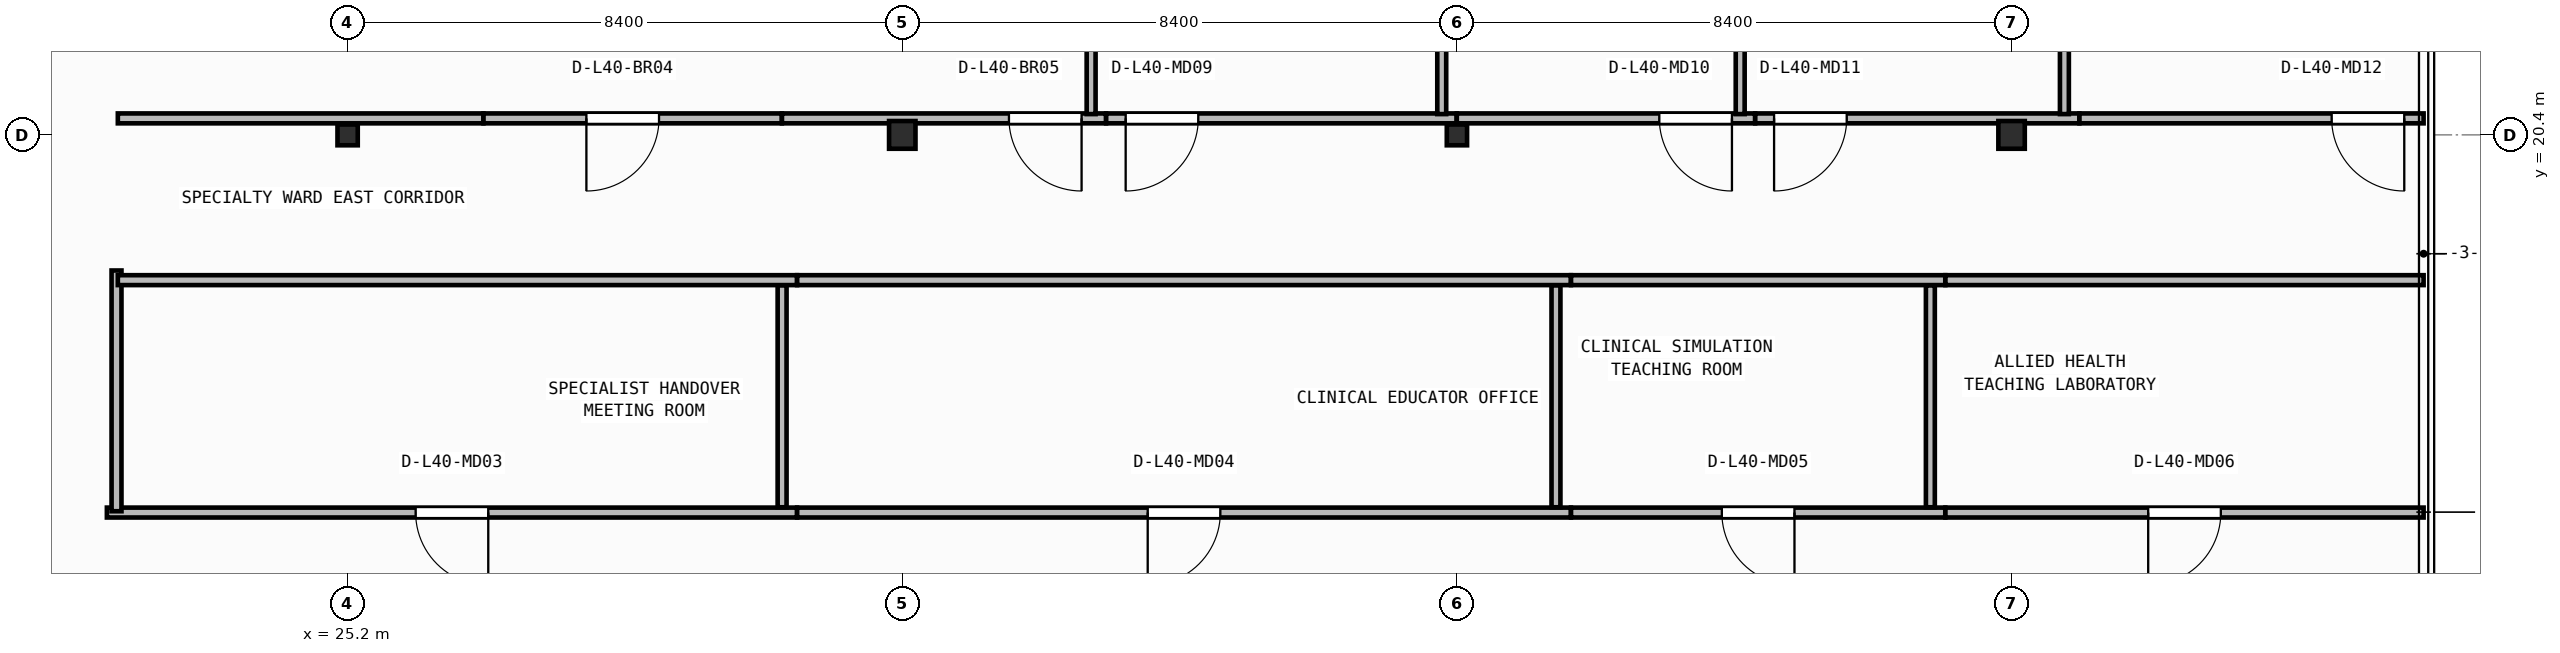
"""IFC4 building model, lengths in metres.
Left out: names, types, materials, properties, quantities, classifications, styles, units other than length and angle.
Written with IfcOpenShell. Run it as: python <this file> out.ifc"""

import sys

from ifc_helpers import new_model, si_unit, direction, frame, frame_2d, origin, origin_2d, place, context, subcontext, project, spatial, rectangle, i_section, extrude, element, fill, save


model = new_model("IFC4")
c1 = context("Model", 3, precision=1e-05, world=origin(), true_north=direction((0.0, 1.0)))
c2 = subcontext(c1, "Body", "Model", "MODEL_VIEW")
j1 = project(units=[si_unit("LENGTHUNIT", "METRE"), si_unit("PLANEANGLEUNIT", "RADIAN")], contexts=[c1])
p1 = place(None, origin())
s1 = spatial("IfcSite", under=j1, at=p1, CompositionType="ELEMENT")
p2 = place(p1, origin())
s2 = spatial("IfcBuilding", under=s1, at=p2, CompositionType="ELEMENT")
p3 = place(p2, frame((0.0, 0.0, 162.6)))
s3 = spatial("IfcBuildingStorey", under=s2, at=p3, CompositionType="ELEMENT", Elevation=162.6)
p4 = place(p3, frame((25.2, 20.4, 0.0), z_axis=(0.0, 0.0, 1.0), x_axis=(1.0, 0.0, 0.0)))
e1 = element("IfcColumn", 1, at=p4, inside=s3, PredefinedType="COLUMN", context=c2, shape_type="SweptSolid", body=[
    extrude(i_section(OverallWidth=0.307, OverallDepth=0.315, WebThickness=0.012, FlangeThickness=0.019, FilletRadius=0.017, at=origin_2d()), origin(), (0.0, 0.0, 1.0), 3.95),
])
p5 = place(p3, frame((33.6, 20.4, 0.0), z_axis=(0.0, 0.0, 1.0), x_axis=(1.0, 0.0, 0.0)))
e2 = element("IfcColumn", 2, at=p5, inside=s3, PredefinedType="COLUMN", context=c2, shape_type="SweptSolid", body=[
    extrude(i_section(OverallWidth=0.4, OverallDepth=0.42, WebThickness=0.025, FlangeThickness=0.04, at=origin_2d()), origin(), (0.0, 0.0, 1.0), 3.95),
])
p6 = place(p3, frame((42.0, 20.4, 0.0), z_axis=(0.0, 0.0, 1.0), x_axis=(1.0, 0.0, 0.0)))
e3 = element("IfcColumn", 3, at=p6, inside=s3, PredefinedType="COLUMN", context=c2, shape_type="SweptSolid", body=[
    extrude(i_section(OverallWidth=0.307, OverallDepth=0.315, WebThickness=0.012, FlangeThickness=0.019, FilletRadius=0.017, at=origin_2d()), origin(), (0.0, 0.0, 1.0), 3.95),
])
p7 = place(p3, frame((50.4, 20.4, 0.0), z_axis=(0.0, 0.0, 1.0), x_axis=(1.0, 0.0, 0.0)))
e4 = element("IfcColumn", 4, at=p7, inside=s3, PredefinedType="COLUMN", context=c2, shape_type="SweptSolid", body=[
    extrude(i_section(OverallWidth=0.4, OverallDepth=0.42, WebThickness=0.025, FlangeThickness=0.04, at=origin_2d()), origin(), (0.0, 0.0, 1.0), 3.95),
])
p8 = place(p3, frame((32.006, 14.68, 0.0), z_axis=(0.0, 0.0, 1.0), x_axis=(-1.0, 0.0, 0.0)))
e5 = element("IfcWall", 5, at=p8, inside=s3, PredefinedType="PARTITIONING", context=c2, shape_type="SweptSolid", body=[
    extrude(rectangle(XDim=10.452, YDim=0.15, at=frame_2d((5.226, 0.0))), origin(), (0.0, 0.0, 1.0), 3.71),
])
p9 = place(p8, frame((4.676, 0.0, 0.0)))
e6 = element("IfcOpeningElement", 6, at=p9, cuts=e5, PredefinedType="OPENING", context=c2, shape_type="SweptSolid", body=[
    extrude(rectangle(XDim=1.1, YDim=2.1, at=frame_2d((0.55, 1.05))), frame((0.0, 0.085, 0.0), z_axis=(0.0, -1.0, 0.0), x_axis=(1.0, 0.0, 0.0)), (0.0, 0.0, 1.0), 0.17),
])
p10 = place(p3, frame((43.726, 14.68, 0.0), z_axis=(0.0, 0.0, 1.0), x_axis=(-1.0, 0.0, 0.0)))
e7 = element("IfcWall", 7, at=p10, inside=s3, PredefinedType="PARTITIONING", context=c2, shape_type="SweptSolid", body=[
    extrude(rectangle(XDim=11.718, YDim=0.15, at=frame_2d((5.859, 0.0))), origin(), (0.0, 0.0, 1.0), 3.71),
])
p11 = place(p10, frame((5.309, 0.0, 0.0)))
e8 = element("IfcOpeningElement", 8, at=p11, cuts=e7, PredefinedType="OPENING", context=c2, shape_type="SweptSolid", body=[
    extrude(rectangle(XDim=1.1, YDim=2.1, at=frame_2d((0.55, 1.05))), frame((0.0, 0.085, 0.0), z_axis=(0.0, -1.0, 0.0), x_axis=(1.0, 0.0, 0.0)), (0.0, 0.0, 1.0), 0.17),
])
p12 = place(p3, frame((49.396, 14.68, 0.0), z_axis=(0.0, 0.0, 1.0), x_axis=(-1.0, 0.0, 0.0)))
e9 = element("IfcWall", 9, at=p12, inside=s3, PredefinedType="PARTITIONING", context=c2, shape_type="SweptSolid", body=[
    extrude(rectangle(XDim=5.668, YDim=0.15, at=frame_2d((2.834, 0.0))), origin(), (0.0, 0.0, 1.0), 3.71),
])
p13 = place(p12, frame((2.284, 0.0, 0.0)))
e10 = element("IfcOpeningElement", 10, at=p13, cuts=e9, PredefinedType="OPENING", context=c2, shape_type="SweptSolid", body=[
    extrude(rectangle(XDim=1.1, YDim=2.1, at=frame_2d((0.55, 1.05))), frame((0.0, 0.085, 0.0), z_axis=(0.0, -1.0, 0.0), x_axis=(1.0, 0.0, 0.0)), (0.0, 0.0, 1.0), 0.17),
])
p14 = place(p3, frame((56.64, 14.68, 0.0), z_axis=(0.0, 0.0, 1.0), x_axis=(-1.0, 0.0, 0.0)))
e11 = element("IfcWall", 11, at=p14, inside=s3, PredefinedType="PARTITIONING", context=c2, shape_type="SweptSolid", body=[
    extrude(rectangle(XDim=7.242, YDim=0.15, at=frame_2d((3.621, 0.0))), origin(), (0.0, 0.0, 1.0), 3.71),
])
p15 = place(p14, frame((3.071, 0.0, 0.0)))
e12 = element("IfcOpeningElement", 12, at=p15, cuts=e11, PredefinedType="OPENING", context=c2, shape_type="SweptSolid", body=[
    extrude(rectangle(XDim=1.1, YDim=2.1, at=frame_2d((0.55, 1.05))), frame((0.0, 0.085, 0.0), z_axis=(0.0, -1.0, 0.0), x_axis=(1.0, 0.0, 0.0)), (0.0, 0.0, 1.0), 0.17),
])
p16 = place(p3, frame((21.7, 14.7, 0.0), z_axis=(0.0, 0.0, 1.0), x_axis=(0.0, 1.0, 0.0)))
e13 = element("IfcWall", 13, at=p16, inside=s3, PredefinedType="PARTITIONING", context=c2, shape_type="SweptSolid", body=[
    extrude(rectangle(XDim=3.646, YDim=0.15, at=frame_2d((1.823, 0.0))), origin(), (0.0, 0.0, 1.0), 3.71),
])
p17 = place(p3, frame((21.72, 18.2, 0.0), z_axis=(0.0, 0.0, 1.0), x_axis=(1.0, 0.0, 0.0)))
e14 = element("IfcWall", 14, at=p17, inside=s3, PredefinedType="PARTITIONING", context=c2, shape_type="SweptSolid", body=[
    extrude(rectangle(XDim=10.286, YDim=0.15, at=frame_2d((5.143, 0.0))), origin(), (0.0, 0.0, 1.0), 3.71),
])
p18 = place(p3, frame((32.008, 18.2, 0.0), z_axis=(0.0, 0.0, 1.0), x_axis=(1.0, 0.0, 0.0)))
e15 = element("IfcWall", 15, at=p18, inside=s3, PredefinedType="PARTITIONING", context=c2, shape_type="SweptSolid", body=[
    extrude(rectangle(XDim=11.718, YDim=0.15, at=frame_2d((5.859, 0.0))), origin(), (0.0, 0.0, 1.0), 3.71),
])
p19 = place(p3, frame((43.728, 18.2, 0.0), z_axis=(0.0, 0.0, 1.0), x_axis=(1.0, 0.0, 0.0)))
e16 = element("IfcWall", 16, at=p19, inside=s3, PredefinedType="PARTITIONING", context=c2, shape_type="SweptSolid", body=[
    extrude(rectangle(XDim=5.668, YDim=0.15, at=frame_2d((2.834, 0.0))), origin(), (0.0, 0.0, 1.0), 3.71),
])
p20 = place(p3, frame((49.398, 18.2, 0.0), z_axis=(0.0, 0.0, 1.0), x_axis=(1.0, 0.0, 0.0)))
e17 = element("IfcWall", 17, at=p20, inside=s3, PredefinedType="PARTITIONING", context=c2, shape_type="SweptSolid", body=[
    extrude(rectangle(XDim=7.242, YDim=0.15, at=frame_2d((3.621, 0.0))), origin(), (0.0, 0.0, 1.0), 3.71),
])
p21 = place(p3, frame((27.256, 20.65, 0.0), z_axis=(0.0, 0.0, 1.0), x_axis=(-1.0, 0.0, 0.0)))
e18 = element("IfcWall", 18, at=p21, inside=s3, PredefinedType="PARTITIONING", context=c2, shape_type="SweptSolid", body=[
    extrude(rectangle(XDim=5.536, YDim=0.15, at=frame_2d((2.768, 0.0))), origin(), (0.0, 0.0, 1.0), 3.083),
])
p22 = place(p3, frame((31.776, 20.65, 0.0), z_axis=(0.0, 0.0, 1.0), x_axis=(-1.0, 0.0, 0.0)))
e19 = element("IfcWall", 19, at=p22, inside=s3, PredefinedType="PARTITIONING", context=c2, shape_type="SweptSolid", body=[
    extrude(rectangle(XDim=4.518, YDim=0.15, at=frame_2d((2.259, 0.0))), origin(), (0.0, 0.0, 1.0), 3.083),
])
p23 = place(p22, frame((1.86, 0.0, 0.0)))
e20 = element("IfcOpeningElement", 20, at=p23, cuts=e19, PredefinedType="OPENING", context=c2, shape_type="SweptSolid", body=[
    extrude(rectangle(XDim=1.1, YDim=2.1, at=frame_2d((0.55, 1.05))), frame((0.0, 0.085, 0.0), z_axis=(0.0, -1.0, 0.0), x_axis=(1.0, 0.0, 0.0)), (0.0, 0.0, 1.0), 0.17),
])
p24 = place(p3, frame((36.686, 20.65, 0.0), z_axis=(0.0, 0.0, 1.0), x_axis=(-1.0, 0.0, 0.0)))
e21 = element("IfcWall", 21, at=p24, inside=s3, PredefinedType="PARTITIONING", context=c2, shape_type="SweptSolid", body=[
    extrude(rectangle(XDim=4.908, YDim=0.15, at=frame_2d((2.454, 0.0))), origin(), (0.0, 0.0, 1.0), 3.083),
])
p25 = place(p24, frame((0.37, 0.0, 0.0)))
e22 = element("IfcOpeningElement", 22, at=p25, cuts=e21, PredefinedType="OPENING", context=c2, shape_type="SweptSolid", body=[
    extrude(rectangle(XDim=1.1, YDim=2.1, at=frame_2d((0.55, 1.05))), frame((0.0, 0.085, 0.0), z_axis=(0.0, -1.0, 0.0), x_axis=(1.0, 0.0, 0.0)), (0.0, 0.0, 1.0), 0.17),
])
p26 = place(p3, frame((41.996, 20.65, 0.0), z_axis=(0.0, 0.0, 1.0), x_axis=(-1.0, 0.0, 0.0)))
e23 = element("IfcWall", 23, at=p26, inside=s3, PredefinedType="PARTITIONING", context=c2, shape_type="SweptSolid", body=[
    extrude(rectangle(XDim=5.308, YDim=0.15, at=frame_2d((2.654, 0.0))), origin(), (0.0, 0.0, 1.0), 3.083),
])
p27 = place(p26, frame((3.913, 0.0, 0.0)))
e24 = element("IfcOpeningElement", 24, at=p27, cuts=e23, PredefinedType="OPENING", context=c2, shape_type="SweptSolid", body=[
    extrude(rectangle(XDim=1.1, YDim=2.1, at=frame_2d((0.55, 1.05))), frame((0.0, 0.085, 0.0), z_axis=(0.0, -1.0, 0.0), x_axis=(1.0, 0.0, 0.0)), (0.0, 0.0, 1.0), 0.17),
])
p28 = place(p3, frame((46.516, 20.65, 0.0), z_axis=(0.0, 0.0, 1.0), x_axis=(-1.0, 0.0, 0.0)))
e25 = element("IfcWall", 25, at=p28, inside=s3, PredefinedType="PARTITIONING", context=c2, shape_type="SweptSolid", body=[
    extrude(rectangle(XDim=4.518, YDim=0.15, at=frame_2d((2.259, 0.0))), origin(), (0.0, 0.0, 1.0), 3.083),
])
p29 = place(p28, frame((0.351, 0.0, 0.0)))
e26 = element("IfcOpeningElement", 26, at=p29, cuts=e25, PredefinedType="OPENING", context=c2, shape_type="SweptSolid", body=[
    extrude(rectangle(XDim=1.1, YDim=2.1, at=frame_2d((0.55, 1.05))), frame((0.0, 0.085, 0.0), z_axis=(0.0, -1.0, 0.0), x_axis=(1.0, 0.0, 0.0)), (0.0, 0.0, 1.0), 0.17),
])
p30 = place(p3, frame((51.426, 20.65, 0.0), z_axis=(0.0, 0.0, 1.0), x_axis=(-1.0, 0.0, 0.0)))
e27 = element("IfcWall", 27, at=p30, inside=s3, PredefinedType="PARTITIONING", context=c2, shape_type="SweptSolid", body=[
    extrude(rectangle(XDim=4.908, YDim=0.15, at=frame_2d((2.454, 0.0))), origin(), (0.0, 0.0, 1.0), 3.083),
])
p31 = place(p30, frame((3.523, 0.0, 0.0)))
e28 = element("IfcOpeningElement", 28, at=p31, cuts=e27, PredefinedType="OPENING", context=c2, shape_type="SweptSolid", body=[
    extrude(rectangle(XDim=1.1, YDim=2.1, at=frame_2d((0.55, 1.05))), frame((0.0, 0.085, 0.0), z_axis=(0.0, -1.0, 0.0), x_axis=(1.0, 0.0, 0.0)), (0.0, 0.0, 1.0), 0.17),
])
p32 = place(p3, frame((56.64, 20.65, 0.0), z_axis=(0.0, 0.0, 1.0), x_axis=(-1.0, 0.0, 0.0)))
e29 = element("IfcWall", 29, at=p32, inside=s3, PredefinedType="PARTITIONING", context=c2, shape_type="SweptSolid", body=[
    extrude(rectangle(XDim=5.212, YDim=0.15, at=frame_2d((2.606, 0.0))), origin(), (0.0, 0.0, 1.0), 3.71),
])
p33 = place(p32, frame((0.293, 0.0, 0.0)))
e30 = element("IfcOpeningElement", 30, at=p33, cuts=e29, PredefinedType="OPENING", context=c2, shape_type="SweptSolid", body=[
    extrude(rectangle(XDim=1.1, YDim=2.1, at=frame_2d((0.55, 1.05))), frame((0.0, 0.085, 0.0), z_axis=(0.0, -1.0, 0.0), x_axis=(1.0, 0.0, 0.0)), (0.0, 0.0, 1.0), 0.17),
])
for number, where, z_axis, x_axis in (
    (31, (31.78, 14.76, 0.0), (0.0, 0.0, 1.0), (0.0, 1.0, 0.0)),
    (32, (43.5, 14.76, 0.0), (0.0, 0.0, 1.0), (0.0, 1.0, 0.0)),
    (33, (49.17, 14.76, 0.0), (0.0, 0.0, 1.0), (0.0, 1.0, 0.0)),
):
    element("IfcWall", number, at=place(p3, frame(where, z_axis=z_axis, x_axis=x_axis)), inside=s3, PredefinedType="PARTITIONING", context=c2, shape_type="SweptSolid", body=[
        extrude(rectangle(XDim=3.36, YDim=0.135, at=frame_2d((1.68, 0.0))), origin(), (0.0, 0.0, 1.0), 3.71),
    ])
p34 = place(p3, frame((36.46, 20.715, 0.0), z_axis=(0.0, 0.0, 1.0), x_axis=(0.0, 1.0, 0.0)))
e34 = element("IfcWall", 34, at=p34, inside=s3, PredefinedType="PARTITIONING", context=c2, shape_type="SweptSolid", body=[
    extrude(rectangle(XDim=6.385, YDim=0.135, at=frame_2d((3.192, 0.0))), origin(), (0.0, 0.0, 1.0), 3.71),
])
p35 = place(p3, frame((41.77, 20.715, 0.0), z_axis=(0.0, 0.0, 1.0), x_axis=(0.0, 1.0, 0.0)))
e35 = element("IfcWall", 35, at=p35, inside=s3, PredefinedType="PARTITIONING", context=c2, shape_type="SweptSolid", body=[
    extrude(rectangle(XDim=6.385, YDim=0.135, at=frame_2d((3.192, 0.0))), origin(), (0.0, 0.0, 1.0), 3.152),
])
for number, where, z_axis, x_axis in (
    (36, (46.29, 20.715, 0.0), (0.0, 0.0, 1.0), (0.0, 1.0, 0.0)),
    (37, (51.2, 20.715, 0.0), (0.0, 0.0, 1.0), (0.0, 1.0, 0.0)),
):
    element("IfcWall", number, at=place(p3, frame(where, z_axis=z_axis, x_axis=x_axis)), inside=s3, PredefinedType="PARTITIONING", context=c2, shape_type="SweptSolid", body=[
        extrude(rectangle(XDim=6.385, YDim=0.135, at=frame_2d((3.192, 0.0))), origin(), (0.0, 0.0, 1.0), 3.71),
    ])
p36 = place(p9, origin())
e38 = element("IfcDoor", 38, at=p36, inside=s3, OperationType="SINGLE_SWING_LEFT", PredefinedType="DOOR", context=c2, shape_type="SweptSolid", body=[
    extrude(rectangle(XDim=1.1, YDim=2.1, at=frame_2d((0.55, 1.05))), frame((0.0, 0.025, 0.0), z_axis=(0.0, -1.0, 0.0), x_axis=(1.0, 0.0, 0.0)), (0.0, 0.0, 1.0), 0.05),
])
fill(e6, e38)
p37 = place(p11, origin())
e39 = element("IfcDoor", 39, at=p37, inside=s3, OperationType="SINGLE_SWING_RIGHT", PredefinedType="DOOR", context=c2, shape_type="SweptSolid", body=[
    extrude(rectangle(XDim=1.1, YDim=2.1, at=frame_2d((0.55, 1.05))), frame((0.0, 0.025, 0.0), z_axis=(0.0, -1.0, 0.0), x_axis=(1.0, 0.0, 0.0)), (0.0, 0.0, 1.0), 0.05),
])
fill(e8, e39)
p38 = place(p13, origin())
e40 = element("IfcDoor", 40, at=p38, inside=s3, OperationType="SINGLE_SWING_LEFT", PredefinedType="DOOR", context=c2, shape_type="SweptSolid", body=[
    extrude(rectangle(XDim=1.1, YDim=2.1, at=frame_2d((0.55, 1.05))), frame((0.0, 0.025, 0.0), z_axis=(0.0, -1.0, 0.0), x_axis=(1.0, 0.0, 0.0)), (0.0, 0.0, 1.0), 0.05),
])
fill(e10, e40)
p39 = place(p15, origin())
e41 = element("IfcDoor", 41, at=p39, inside=s3, OperationType="SINGLE_SWING_RIGHT", PredefinedType="DOOR", context=c2, shape_type="SweptSolid", body=[
    extrude(rectangle(XDim=1.1, YDim=2.1, at=frame_2d((0.55, 1.05))), frame((0.0, 0.025, 0.0), z_axis=(0.0, -1.0, 0.0), x_axis=(1.0, 0.0, 0.0)), (0.0, 0.0, 1.0), 0.05),
])
fill(e12, e41)
p40 = place(p23, origin())
e42 = element("IfcDoor", 42, at=p40, inside=s3, OperationType="SINGLE_SWING_RIGHT", PredefinedType="DOOR", context=c2, shape_type="SweptSolid", body=[
    extrude(rectangle(XDim=1.1, YDim=2.1, at=frame_2d((0.55, 1.05))), frame((0.0, 0.025, 0.0), z_axis=(0.0, -1.0, 0.0), x_axis=(1.0, 0.0, 0.0)), (0.0, 0.0, 1.0), 0.05),
])
fill(e20, e42)
p41 = place(p25, origin())
e43 = element("IfcDoor", 43, at=p41, inside=s3, OperationType="SINGLE_SWING_LEFT", PredefinedType="DOOR", context=c2, shape_type="SweptSolid", body=[
    extrude(rectangle(XDim=1.1, YDim=2.1, at=frame_2d((0.55, 1.05))), frame((0.0, 0.025, 0.0), z_axis=(0.0, -1.0, 0.0), x_axis=(1.0, 0.0, 0.0)), (0.0, 0.0, 1.0), 0.05),
])
fill(e22, e43)
p42 = place(p27, origin())
e44 = element("IfcDoor", 44, at=p42, inside=s3, OperationType="SINGLE_SWING_RIGHT", PredefinedType="DOOR", context=c2, shape_type="SweptSolid", body=[
    extrude(rectangle(XDim=1.1, YDim=2.1, at=frame_2d((0.55, 1.05))), frame((0.0, 0.025, 0.0), z_axis=(0.0, -1.0, 0.0), x_axis=(1.0, 0.0, 0.0)), (0.0, 0.0, 1.0), 0.05),
])
fill(e24, e44)
p43 = place(p29, origin())
e45 = element("IfcDoor", 45, at=p43, inside=s3, OperationType="SINGLE_SWING_LEFT", PredefinedType="DOOR", context=c2, shape_type="SweptSolid", body=[
    extrude(rectangle(XDim=1.1, YDim=2.1, at=frame_2d((0.55, 1.05))), frame((0.0, 0.025, 0.0), z_axis=(0.0, -1.0, 0.0), x_axis=(1.0, 0.0, 0.0)), (0.0, 0.0, 1.0), 0.05),
])
fill(e26, e45)
p44 = place(p31, origin())
e46 = element("IfcDoor", 46, at=p44, inside=s3, OperationType="SINGLE_SWING_RIGHT", PredefinedType="DOOR", context=c2, shape_type="SweptSolid", body=[
    extrude(rectangle(XDim=1.1, YDim=2.1, at=frame_2d((0.55, 1.05))), frame((0.0, 0.025, 0.0), z_axis=(0.0, -1.0, 0.0), x_axis=(1.0, 0.0, 0.0)), (0.0, 0.0, 1.0), 0.05),
])
fill(e28, e46)
p45 = place(p33, origin())
e47 = element("IfcDoor", 47, at=p45, inside=s3, OperationType="SINGLE_SWING_LEFT", PredefinedType="DOOR", context=c2, shape_type="SweptSolid", body=[
    extrude(rectangle(XDim=1.1, YDim=2.1, at=frame_2d((0.55, 1.05))), frame((0.0, 0.025, 0.0), z_axis=(0.0, -1.0, 0.0), x_axis=(1.0, 0.0, 0.0)), (0.0, 0.0, 1.0), 0.05),
])
fill(e30, e47)
save(model, sys.argv[1])
